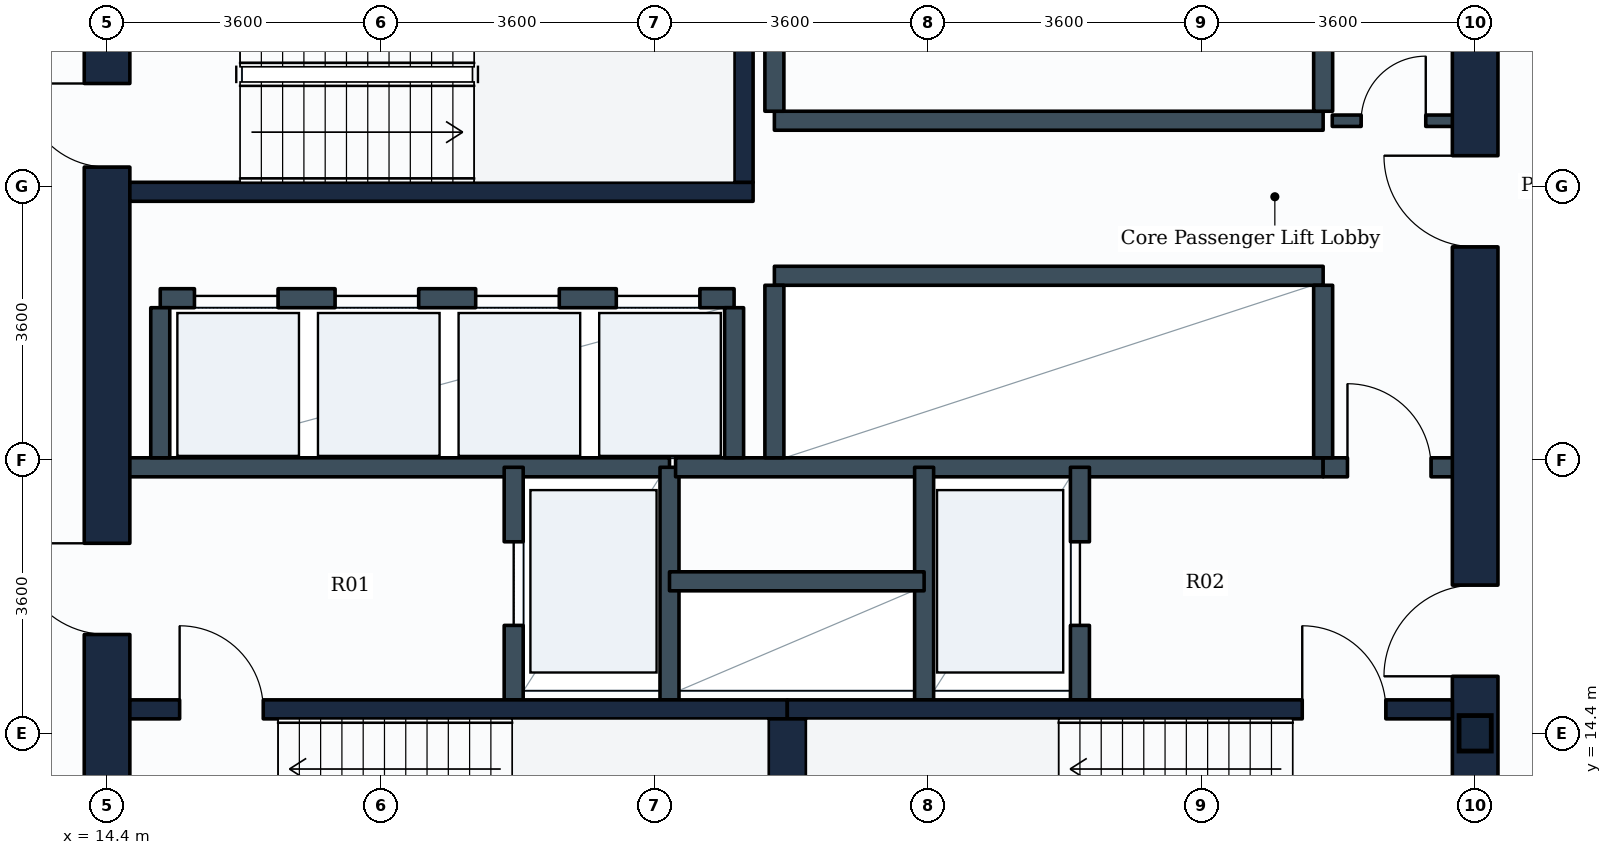
"""IFC4 building model, lengths in metres.
Left out: names, types, materials, properties, quantities, classifications, styles, units other than length and angle.
Written with IfcOpenShell. Run it as: python <this file> out.ifc"""

import sys

from ifc_helpers import new_model, si_unit, direction, frame, frame_2d, origin, origin_2d, place, context, subcontext, project, spatial, rectangle, i_section, extrude, element, fill, save


model = new_model("IFC4")
c1 = context("Model", 3, precision=1e-05, world=origin(), true_north=direction((0.0, 1.0)))
c2 = subcontext(c1, "Body", "Model", "MODEL_VIEW")
j1 = project(units=[si_unit("LENGTHUNIT", "METRE"), si_unit("PLANEANGLEUNIT", "RADIAN")], contexts=[c1])
p1 = place(None, origin())
s1 = spatial("IfcSite", under=j1, at=p1, CompositionType="ELEMENT")
p2 = place(p1, origin())
s2 = spatial("IfcBuilding", under=s1, at=p2, CompositionType="ELEMENT")
p3 = place(p2, frame((0.0, 0.0, 66.9)))
s3 = spatial("IfcBuildingStorey", under=s2, at=p3, CompositionType="ELEMENT", Elevation=66.9)
p4 = place(p3, frame((32.4, 14.4, 0.0), z_axis=(0.0, 0.0, 1.0), x_axis=(1.0, 0.0, 0.0)))
e1 = element("IfcColumn", 1, at=p4, inside=s3, PredefinedType="COLUMN", context=c2, shape_type="SweptSolid", body=[
    extrude(i_section(OverallWidth=0.424, OverallDepth=0.467, WebThickness=0.033, FlangeThickness=0.053, FilletRadius=0.015, at=origin_2d()), origin(), (0.0, 0.0, 1.0), 3.9),
])
p5 = place(p3, frame((14.4, 10.8, 0.0), z_axis=(0.0, 0.0, 1.0), x_axis=(0.0, 1.0, 0.0)))
e2 = element("IfcWall", 2, at=p5, inside=s3, PredefinedType="SHEAR", context=c2, shape_type="SweptSolid", body=[
    extrude(rectangle(XDim=14.4, YDim=0.6, at=frame_2d((7.2, 0.0))), origin(), (0.0, 0.0, 1.0), 3.65),
])
p6 = place(p5, frame((11.05, 0.0, 0.0)))
e3 = element("IfcOpeningElement", 3, at=p6, cuts=e2, PredefinedType="OPENING", context=c2, shape_type="SweptSolid", body=[
    extrude(rectangle(XDim=1.1, YDim=2.1, at=frame_2d((0.55, 1.05))), frame((0.0, 0.31, 0.0), z_axis=(0.0, -1.0, 0.0), x_axis=(1.0, 0.0, 0.0)), (0.0, 0.0, 1.0), 0.62),
])
p7 = place(p5, frame((4.9, 0.0, 0.0)))
e4 = element("IfcOpeningElement", 4, at=p7, cuts=e2, PredefinedType="OPENING", context=c2, shape_type="SweptSolid", body=[
    extrude(rectangle(XDim=1.2, YDim=2.1, at=frame_2d((0.6, 1.05))), frame((0.0, 0.31, 0.0), z_axis=(0.0, -1.0, 0.0), x_axis=(1.0, 0.0, 0.0)), (0.0, 0.0, 1.0), 0.62),
])
p8 = place(p3, frame((32.4, 10.8, 0.0), z_axis=(0.0, 0.0, 1.0), x_axis=(0.0, 1.0, 0.0)))
e5 = element("IfcWall", 5, at=p8, inside=s3, PredefinedType="SHEAR", context=c2, shape_type="SweptSolid", body=[
    extrude(rectangle(XDim=14.4, YDim=0.6, at=frame_2d((7.2, 0.0))), origin(), (0.0, 0.0, 1.0), 3.65),
])
p9 = place(p8, frame((4.35, 0.0, 0.0)))
e6 = element("IfcOpeningElement", 6, at=p9, cuts=e5, PredefinedType="OPENING", context=c2, shape_type="SweptSolid", body=[
    extrude(rectangle(XDim=1.2, YDim=2.1, at=frame_2d((0.6, 1.05))), frame((0.0, 0.31, 0.0), z_axis=(0.0, -1.0, 0.0), x_axis=(1.0, 0.0, 0.0)), (0.0, 0.0, 1.0), 0.62),
])
p10 = place(p8, frame((10.0, 0.0, 0.0)))
e7 = element("IfcOpeningElement", 7, at=p10, cuts=e5, PredefinedType="OPENING", context=c2, shape_type="SweptSolid", body=[
    extrude(rectangle(XDim=1.2, YDim=2.1, at=frame_2d((0.6, 1.05))), frame((0.0, 0.31, 0.0), z_axis=(0.0, -1.0, 0.0), x_axis=(1.0, 0.0, 0.0)), (0.0, 0.0, 1.0), 0.62),
])
p11 = place(p3, frame((14.7, 14.715, 0.0), z_axis=(0.0, 0.0, 1.0), x_axis=(1.0, 0.0, 0.0)))
e8 = element("IfcWall", 8, at=p11, inside=s3, PredefinedType="SHEAR", context=c2, shape_type="SweptSolid", body=[
    extrude(rectangle(XDim=8.65, YDim=0.25, at=frame_2d((4.325, 0.0))), origin(), (0.0, 0.0, 1.0), 3.65),
])
p12 = place(p11, frame((0.655, 0.0, 0.0)))
e9 = element("IfcOpeningElement", 9, at=p12, cuts=e8, PredefinedType="OPENING", context=c2, shape_type="SweptSolid", body=[
    extrude(rectangle(XDim=1.1, YDim=2.1, at=frame_2d((0.55, 1.05))), frame((0.0, 0.135, 0.0), z_axis=(0.0, -1.0, 0.0), x_axis=(1.0, 0.0, 0.0)), (0.0, 0.0, 1.0), 0.27),
])
p13 = place(p3, frame((23.35, 14.715, 0.0), z_axis=(0.0, 0.0, 1.0), x_axis=(1.0, 0.0, 0.0)))
e10 = element("IfcWall", 10, at=p13, inside=s3, PredefinedType="SHEAR", context=c2, shape_type="SweptSolid", body=[
    extrude(rectangle(XDim=8.75, YDim=0.25, at=frame_2d((4.375, 0.0))), origin(), (0.0, 0.0, 1.0), 3.65),
])
p14 = place(p13, frame((6.775, 0.0, 0.0)))
e11 = element("IfcOpeningElement", 11, at=p14, cuts=e10, PredefinedType="OPENING", context=c2, shape_type="SweptSolid", body=[
    extrude(rectangle(XDim=1.1, YDim=2.1, at=frame_2d((0.55, 1.05))), frame((0.0, 0.135, 0.0), z_axis=(0.0, -1.0, 0.0), x_axis=(1.0, 0.0, 0.0)), (0.0, 0.0, 1.0), 0.27),
])
p15 = place(p3, frame((23.35, 11.75, 0.0), z_axis=(0.0, 0.0, 1.0), x_axis=(0.0, 1.0, 0.0)))
e12 = element("IfcWall", 12, at=p15, inside=s3, PredefinedType="SHEAR", context=c2, shape_type="SweptSolid", body=[
    extrude(rectangle(XDim=2.84, YDim=0.5, at=frame_2d((1.42, 0.0))), origin(), (0.0, 0.0, 1.0), 3.65),
])
p16 = place(p3, frame((14.7, 21.525, 0.0), z_axis=(0.0, 0.0, 1.0), x_axis=(1.0, 0.0, 0.0)))
e13 = element("IfcWall", 13, at=p16, inside=s3, PredefinedType="SHEAR", context=c2, shape_type="SweptSolid", body=[
    extrude(rectangle(XDim=8.2, YDim=0.25, at=frame_2d((4.1, 0.0))), origin(), (0.0, 0.0, 1.0), 3.65),
])
p17 = place(p3, frame((22.775, 21.65, 0.0), z_axis=(0.0, 0.0, 1.0), x_axis=(0.0, 1.0, 0.0)))
e14 = element("IfcWall", 14, at=p17, inside=s3, PredefinedType="SHEAR", context=c2, shape_type="SweptSolid", body=[
    extrude(rectangle(XDim=2.84, YDim=0.25, at=frame_2d((1.42, 0.0))), origin(), (0.0, 0.0, 1.0), 3.65),
])
p18 = place(p3, frame((14.65, 17.9, 0.0), z_axis=(0.0, 0.0, 1.0), x_axis=(1.0, 0.0, 0.0)))
e15 = element("IfcWall", 15, at=p18, inside=s3, PredefinedType="PARTITIONING", context=c2, shape_type="SweptSolid", body=[
    extrude(rectangle(XDim=7.15, YDim=0.25, at=frame_2d((3.575, 0.0))), origin(), (0.0, 0.0, 1.0), 3.635),
])
p19 = place(p3, frame((19.75, 14.84, 0.0), z_axis=(0.0, 0.0, 1.0), x_axis=(0.0, 1.0, 0.0)))
e16 = element("IfcWall", 16, at=p19, inside=s3, PredefinedType="PARTITIONING", context=c2, shape_type="SweptSolid", body=[
    extrude(rectangle(XDim=3.06, YDim=0.25, at=frame_2d((1.53, 0.0))), origin(), (0.0, 0.0, 1.0), 3.635),
])
p20 = place(p19, frame((0.98, 0.0, 0.0)))
e17 = element("IfcOpeningElement", 17, at=p20, cuts=e16, PredefinedType="OPENING", context=c2, shape_type="SweptSolid", body=[
    extrude(rectangle(XDim=1.1, YDim=2.1, at=frame_2d((0.55, 1.05))), frame((0.0, 0.135, 0.0), z_axis=(0.0, -1.0, 0.0), x_axis=(1.0, 0.0, 0.0)), (0.0, 0.0, 1.0), 0.27),
])
p21 = place(p3, frame((21.8, 14.84, 0.0), z_axis=(0.0, 0.0, 1.0), x_axis=(0.0, 1.0, 0.0)))
e18 = element("IfcWall", 18, at=p21, inside=s3, PredefinedType="PARTITIONING", context=c2, shape_type="SweptSolid", body=[
    extrude(rectangle(XDim=3.06, YDim=0.25, at=frame_2d((1.53, 0.0))), origin(), (0.0, 0.0, 1.0), 3.635),
])
p22 = place(p3, frame((21.88, 17.9, 0.0), z_axis=(0.0, 0.0, 1.0), x_axis=(1.0, 0.0, 0.0)))
e19 = element("IfcWall", 19, at=p22, inside=s3, PredefinedType="PARTITIONING", context=c2, shape_type="SweptSolid", body=[
    extrude(rectangle(XDim=8.52, YDim=0.25, at=frame_2d((4.26, 0.0))), origin(), (0.0, 0.0, 1.0), 3.635),
])
p23 = place(p3, frame((30.4, 17.9, 0.0), z_axis=(0.0, 0.0, 1.0), x_axis=(1.0, 0.0, 0.0)))
e20 = element("IfcWall", 20, at=p23, inside=s3, PredefinedType="PARTITIONING", context=c2, shape_type="SweptSolid", body=[
    extrude(rectangle(XDim=1.75, YDim=0.25, at=frame_2d((0.875, 0.0))), origin(), (0.0, 0.0, 1.0), 3.635),
])
p24 = place(p23, frame((0.32, 0.0, 0.0)))
e21 = element("IfcOpeningElement", 21, at=p24, cuts=e20, PredefinedType="OPENING", context=c2, shape_type="SweptSolid", body=[
    extrude(rectangle(XDim=1.1, YDim=2.1, at=frame_2d((0.55, 1.05))), frame((0.0, 0.135, 0.0), z_axis=(0.0, -1.0, 0.0), x_axis=(1.0, 0.0, 0.0)), (0.0, 0.0, 1.0), 0.27),
])
p25 = place(p3, frame((25.15, 14.84, 0.0), z_axis=(0.0, 0.0, 1.0), x_axis=(0.0, 1.0, 0.0)))
e22 = element("IfcWall", 22, at=p25, inside=s3, PredefinedType="PARTITIONING", context=c2, shape_type="SweptSolid", body=[
    extrude(rectangle(XDim=3.06, YDim=0.25, at=frame_2d((1.53, 0.0))), origin(), (0.0, 0.0, 1.0), 3.635),
])
p26 = place(p3, frame((27.2, 14.84, 0.0), z_axis=(0.0, 0.0, 1.0), x_axis=(0.0, 1.0, 0.0)))
e23 = element("IfcWall", 23, at=p26, inside=s3, PredefinedType="PARTITIONING", context=c2, shape_type="SweptSolid", body=[
    extrude(rectangle(XDim=3.06, YDim=0.25, at=frame_2d((1.53, 0.0))), origin(), (0.0, 0.0, 1.0), 3.635),
])
p27 = place(p26, frame((0.98, 0.0, 0.0)))
e24 = element("IfcOpeningElement", 24, at=p27, cuts=e23, PredefinedType="OPENING", context=c2, shape_type="SweptSolid", body=[
    extrude(rectangle(XDim=1.1, YDim=2.1, at=frame_2d((0.55, 1.05))), frame((0.0, 0.135, 0.0), z_axis=(0.0, -1.0, 0.0), x_axis=(1.0, 0.0, 0.0)), (0.0, 0.0, 1.0), 0.27),
])
p28 = place(p3, frame((21.8, 16.4, 0.0), z_axis=(0.0, 0.0, 1.0), x_axis=(1.0, 0.0, 0.0)))
e25 = element("IfcWall", 25, at=p28, inside=s3, PredefinedType="PARTITIONING", context=c2, shape_type="SweptSolid", body=[
    extrude(rectangle(XDim=3.35, YDim=0.25, at=frame_2d((1.675, 0.0))), origin(), (0.0, 0.0, 1.0), 3.635),
])
p29 = place(p3, frame((15.1, 20.125, 0.0), z_axis=(0.0, 0.0, 1.0), x_axis=(1.0, 0.0, 0.0)))
e26 = element("IfcWall", 26, at=p29, inside=s3, PredefinedType="PARTITIONING", context=c2, shape_type="SweptSolid", body=[
    extrude(rectangle(XDim=7.55, YDim=0.25, at=frame_2d((3.775, 0.0))), origin(), (0.0, 0.0, 1.0), 3.635),
])
p30 = place(p29, frame((0.45, 0.0, 0.0)))
e27 = element("IfcOpeningElement", 27, at=p30, cuts=e26, PredefinedType="OPENING", context=c2, shape_type="SweptSolid", body=[
    extrude(rectangle(XDim=1.1, YDim=2.1, at=frame_2d((0.55, 1.05))), frame((0.0, 0.135, 0.0), z_axis=(0.0, -1.0, 0.0), x_axis=(1.0, 0.0, 0.0)), (0.0, 0.0, 1.0), 0.27),
])
p31 = place(p29, frame((2.3, 0.0, 0.0)))
e28 = element("IfcOpeningElement", 28, at=p31, cuts=e26, PredefinedType="OPENING", context=c2, shape_type="SweptSolid", body=[
    extrude(rectangle(XDim=1.1, YDim=2.1, at=frame_2d((0.55, 1.05))), frame((0.0, 0.135, 0.0), z_axis=(0.0, -1.0, 0.0), x_axis=(1.0, 0.0, 0.0)), (0.0, 0.0, 1.0), 0.27),
])
p32 = place(p29, frame((4.15, 0.0, 0.0)))
e29 = element("IfcOpeningElement", 29, at=p32, cuts=e26, PredefinedType="OPENING", context=c2, shape_type="SweptSolid", body=[
    extrude(rectangle(XDim=1.1, YDim=2.1, at=frame_2d((0.55, 1.05))), frame((0.0, 0.135, 0.0), z_axis=(0.0, -1.0, 0.0), x_axis=(1.0, 0.0, 0.0)), (0.0, 0.0, 1.0), 0.27),
])
p33 = place(p29, frame((6.0, 0.0, 0.0)))
e30 = element("IfcOpeningElement", 30, at=p33, cuts=e26, PredefinedType="OPENING", context=c2, shape_type="SweptSolid", body=[
    extrude(rectangle(XDim=1.1, YDim=2.1, at=frame_2d((0.55, 1.05))), frame((0.0, 0.135, 0.0), z_axis=(0.0, -1.0, 0.0), x_axis=(1.0, 0.0, 0.0)), (0.0, 0.0, 1.0), 0.27),
])
for number, where, z_axis, x_axis in (
    (31, (15.1, 18.025, 0.0), (0.0, 0.0, 1.0), (0.0, 1.0, 0.0)),
    (32, (22.65, 18.025, 0.0), (0.0, 0.0, 1.0), (0.0, 1.0, 0.0)),
):
    element("IfcWall", number, at=place(p3, frame(where, z_axis=z_axis, x_axis=x_axis)), inside=s3, PredefinedType="PARTITIONING", context=c2, shape_type="SweptSolid", body=[
        extrude(rectangle(XDim=1.975, YDim=0.25, at=frame_2d((0.988, 0.0))), origin(), (0.0, 0.0, 1.0), 3.635),
    ])
p34 = place(p3, frame((23.18, 20.42, 0.0), z_axis=(0.0, 0.0, 1.0), x_axis=(1.0, 0.0, 0.0)))
e33 = element("IfcWall", 33, at=p34, inside=s3, PredefinedType="PARTITIONING", context=c2, shape_type="SweptSolid", body=[
    extrude(rectangle(XDim=7.22, YDim=0.25, at=frame_2d((3.61, 0.0))), origin(), (0.0, 0.0, 1.0), 3.635),
])
for number, where, z_axis, x_axis in (
    (34, (23.18, 18.025, 0.0), (0.0, 0.0, 1.0), (0.0, 1.0, 0.0)),
    (35, (30.4, 18.025, 0.0), (0.0, 0.0, 1.0), (0.0, 1.0, 0.0)),
):
    element("IfcWall", number, at=place(p3, frame(where, z_axis=z_axis, x_axis=x_axis)), inside=s3, PredefinedType="PARTITIONING", context=c2, shape_type="SweptSolid", body=[
        extrude(rectangle(XDim=2.27, YDim=0.25, at=frame_2d((1.135, 0.0))), origin(), (0.0, 0.0, 1.0), 3.635),
    ])
p35 = place(p3, frame((23.18, 22.46, 0.0), z_axis=(0.0, 0.0, 1.0), x_axis=(1.0, 0.0, 0.0)))
e36 = element("IfcWall", 36, at=p35, inside=s3, PredefinedType="PARTITIONING", context=c2, shape_type="SweptSolid", body=[
    extrude(rectangle(XDim=7.22, YDim=0.25, at=frame_2d((3.61, 0.0))), origin(), (0.0, 0.0, 1.0), 3.635),
])
for number, where, z_axis, x_axis in (
    (37, (23.18, 22.585, 0.0), (0.0, 0.0, 1.0), (0.0, 1.0, 0.0)),
    (38, (30.4, 22.585, 0.0), (0.0, 0.0, 1.0), (0.0, 1.0, 0.0)),
):
    element("IfcWall", number, at=place(p3, frame(where, z_axis=z_axis, x_axis=x_axis)), inside=s3, PredefinedType="PARTITIONING", context=c2, shape_type="SweptSolid", body=[
        extrude(rectangle(XDim=2.315, YDim=0.25, at=frame_2d((1.157, 0.0))), origin(), (0.0, 0.0, 1.0), 3.635),
    ])
p36 = place(p3, frame((30.52, 22.46, 0.0), z_axis=(0.0, 0.0, 1.0), x_axis=(1.0, 0.0, 0.0)))
e39 = element("IfcWall", 39, at=p36, inside=s3, PredefinedType="PARTITIONING", context=c2, shape_type="SweptSolid", body=[
    extrude(rectangle(XDim=1.63, YDim=0.15, at=frame_2d((0.815, 0.0))), origin(), (0.0, 0.0, 1.0), 3.635),
])
p37 = place(p36, frame((0.38, 0.0, 0.0)))
e40 = element("IfcOpeningElement", 40, at=p37, cuts=e39, PredefinedType="OPENING", context=c2, shape_type="SweptSolid", body=[
    extrude(rectangle(XDim=0.85, YDim=2.1, at=frame_2d((0.425, 1.05))), frame((0.0, 0.085, 0.0), z_axis=(0.0, -1.0, 0.0), x_axis=(1.0, 0.0, 0.0)), (0.0, 0.0, 1.0), 0.17),
])
p38 = place(p12, origin())
e41 = element("IfcDoor", 41, at=p38, inside=s3, OperationType="SINGLE_SWING_LEFT", PredefinedType="DOOR", context=c2, shape_type="SweptSolid", body=[
    extrude(rectangle(XDim=1.1, YDim=2.1, at=frame_2d((0.55, 1.05))), frame((0.0, 0.025, 0.0), z_axis=(0.0, -1.0, 0.0), x_axis=(1.0, 0.0, 0.0)), (0.0, 0.0, 1.0), 0.05),
])
fill(e9, e41)
p39 = place(p14, origin())
e42 = element("IfcDoor", 42, at=p39, inside=s3, OperationType="SINGLE_SWING_LEFT", PredefinedType="DOOR", context=c2, shape_type="SweptSolid", body=[
    extrude(rectangle(XDim=1.1, YDim=2.1, at=frame_2d((0.55, 1.05))), frame((0.0, 0.025, 0.0), z_axis=(0.0, -1.0, 0.0), x_axis=(1.0, 0.0, 0.0)), (0.0, 0.0, 1.0), 0.05),
])
fill(e11, e42)
p40 = place(p6, origin())
e43 = element("IfcDoor", 43, at=p40, inside=s3, OperationType="SINGLE_SWING_RIGHT", PredefinedType="DOOR", context=c2, shape_type="SweptSolid", body=[
    extrude(rectangle(XDim=1.1, YDim=2.1, at=frame_2d((0.55, 1.05))), frame((0.0, 0.025, 0.0), z_axis=(0.0, -1.0, 0.0), x_axis=(1.0, 0.0, 0.0)), (0.0, 0.0, 1.0), 0.05),
])
fill(e3, e43)
p41 = place(p20, origin())
e44 = element("IfcDoor", 44, at=p41, inside=s3, OperationType="SLIDING_TO_LEFT", PredefinedType="DOOR", context=c2, shape_type="SweptSolid", body=[
    extrude(rectangle(XDim=1.1, YDim=2.1, at=frame_2d((0.55, 1.05))), frame((0.0, 0.025, 0.0), z_axis=(0.0, -1.0, 0.0), x_axis=(1.0, 0.0, 0.0)), (0.0, 0.0, 1.0), 0.05),
])
fill(e17, e44)
p42 = place(p27, origin())
e45 = element("IfcDoor", 45, at=p42, inside=s3, OperationType="SLIDING_TO_LEFT", PredefinedType="DOOR", context=c2, shape_type="SweptSolid", body=[
    extrude(rectangle(XDim=1.1, YDim=2.1, at=frame_2d((0.55, 1.05))), frame((0.0, 0.025, 0.0), z_axis=(0.0, -1.0, 0.0), x_axis=(1.0, 0.0, 0.0)), (0.0, 0.0, 1.0), 0.05),
])
fill(e24, e45)
p43 = place(p7, origin())
e46 = element("IfcDoor", 46, at=p43, inside=s3, OperationType="SINGLE_SWING_RIGHT", PredefinedType="DOOR", context=c2, shape_type="SweptSolid", body=[
    extrude(rectangle(XDim=1.2, YDim=2.1, at=frame_2d((0.6, 1.05))), frame((0.0, 0.025, 0.0), z_axis=(0.0, -1.0, 0.0), x_axis=(1.0, 0.0, 0.0)), (0.0, 0.0, 1.0), 0.05),
])
fill(e4, e46)
p44 = place(p9, origin())
e47 = element("IfcDoor", 47, at=p44, inside=s3, OperationType="SINGLE_SWING_LEFT", PredefinedType="DOOR", context=c2, shape_type="SweptSolid", body=[
    extrude(rectangle(XDim=1.2, YDim=2.1, at=frame_2d((0.6, 1.05))), frame((0.0, 0.025, 0.0), z_axis=(0.0, -1.0, 0.0), x_axis=(1.0, 0.0, 0.0)), (0.0, 0.0, 1.0), 0.05),
])
fill(e6, e47)
p45 = place(p24, origin())
e48 = element("IfcDoor", 48, at=p45, inside=s3, OperationType="SINGLE_SWING_LEFT", PredefinedType="DOOR", context=c2, shape_type="SweptSolid", body=[
    extrude(rectangle(XDim=1.1, YDim=2.1, at=frame_2d((0.55, 1.05))), frame((0.0, 0.025, 0.0), z_axis=(0.0, -1.0, 0.0), x_axis=(1.0, 0.0, 0.0)), (0.0, 0.0, 1.0), 0.05),
])
fill(e21, e48)
p46 = place(p30, origin())
e49 = element("IfcDoor", 49, at=p46, inside=s3, OperationType="SLIDING_TO_LEFT", PredefinedType="DOOR", context=c2, shape_type="SweptSolid", body=[
    extrude(rectangle(XDim=1.1, YDim=2.1, at=frame_2d((0.55, 1.05))), frame((0.0, 0.025, 0.0), z_axis=(0.0, -1.0, 0.0), x_axis=(1.0, 0.0, 0.0)), (0.0, 0.0, 1.0), 0.05),
])
fill(e27, e49)
p47 = place(p31, origin())
e50 = element("IfcDoor", 50, at=p47, inside=s3, OperationType="SLIDING_TO_LEFT", PredefinedType="DOOR", context=c2, shape_type="SweptSolid", body=[
    extrude(rectangle(XDim=1.1, YDim=2.1, at=frame_2d((0.55, 1.05))), frame((0.0, 0.025, 0.0), z_axis=(0.0, -1.0, 0.0), x_axis=(1.0, 0.0, 0.0)), (0.0, 0.0, 1.0), 0.05),
])
fill(e28, e50)
p48 = place(p32, origin())
e51 = element("IfcDoor", 51, at=p48, inside=s3, OperationType="SLIDING_TO_LEFT", PredefinedType="DOOR", context=c2, shape_type="SweptSolid", body=[
    extrude(rectangle(XDim=1.1, YDim=2.1, at=frame_2d((0.55, 1.05))), frame((0.0, 0.025, 0.0), z_axis=(0.0, -1.0, 0.0), x_axis=(1.0, 0.0, 0.0)), (0.0, 0.0, 1.0), 0.05),
])
fill(e29, e51)
p49 = place(p33, origin())
e52 = element("IfcDoor", 52, at=p49, inside=s3, OperationType="SLIDING_TO_LEFT", PredefinedType="DOOR", context=c2, shape_type="SweptSolid", body=[
    extrude(rectangle(XDim=1.1, YDim=2.1, at=frame_2d((0.55, 1.05))), frame((0.0, 0.025, 0.0), z_axis=(0.0, -1.0, 0.0), x_axis=(1.0, 0.0, 0.0)), (0.0, 0.0, 1.0), 0.05),
])
fill(e30, e52)
p50 = place(p10, origin())
e53 = element("IfcDoor", 53, at=p50, inside=s3, OperationType="SINGLE_SWING_RIGHT", PredefinedType="DOOR", context=c2, shape_type="SweptSolid", body=[
    extrude(rectangle(XDim=1.2, YDim=2.1, at=frame_2d((0.6, 1.05))), frame((0.0, 0.025, 0.0), z_axis=(0.0, -1.0, 0.0), x_axis=(1.0, 0.0, 0.0)), (0.0, 0.0, 1.0), 0.05),
])
fill(e7, e53)
p51 = place(p37, origin())
e54 = element("IfcDoor", 54, at=p51, inside=s3, OperationType="SINGLE_SWING_RIGHT", PredefinedType="DOOR", context=c2, shape_type="SweptSolid", body=[
    extrude(rectangle(XDim=0.85, YDim=2.1, at=frame_2d((0.425, 1.05))), frame((0.0, 0.025, 0.0), z_axis=(0.0, -1.0, 0.0), x_axis=(1.0, 0.0, 0.0)), (0.0, 0.0, 1.0), 0.05),
])
fill(e40, e54)
save(model, sys.argv[1])
